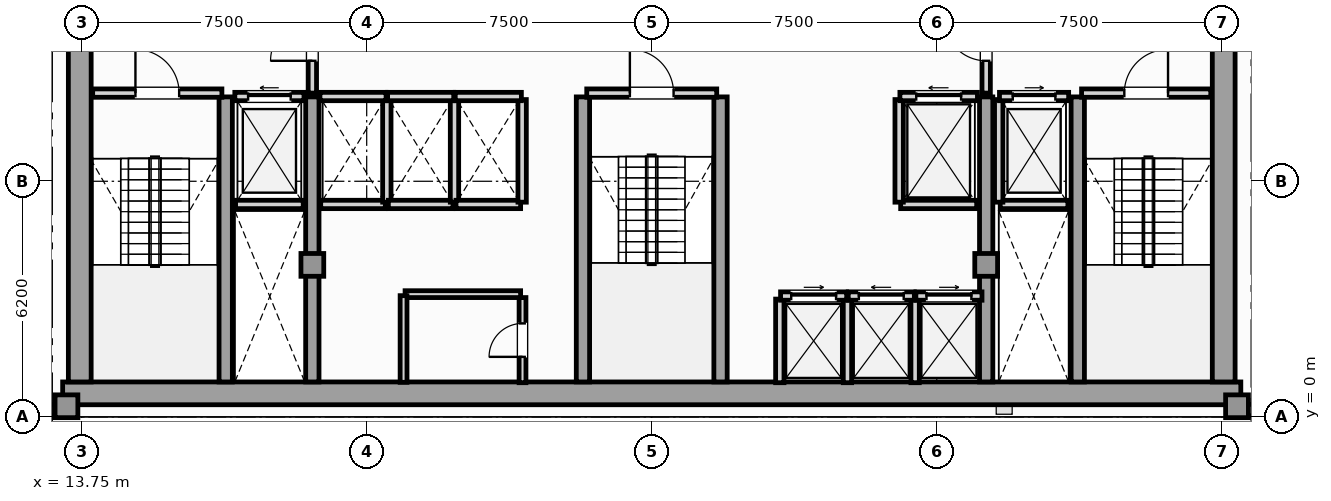
"""IFC4 building model, lengths in metres.
Left out: names, types, materials, properties, quantities, classifications, styles, units other than length and angle.
Written with IfcOpenShell. Run it as: python <this file> out.ifc"""

import sys

from ifc_helpers import new_model, si_unit, direction, frame, frame_2d, origin, origin_2d, place, context, subcontext, project, spatial, rectangle, extrude, element, fill, save


model = new_model("IFC4")
c1 = context("Model", 3, precision=1e-05, world=origin(), true_north=direction((0.0, 1.0)))
c2 = subcontext(c1, "Body", "Model", "MODEL_VIEW")
j1 = project(units=[si_unit("LENGTHUNIT", "METRE"), si_unit("PLANEANGLEUNIT", "RADIAN")], contexts=[c1])
p1 = place(None, origin())
s1 = spatial("IfcSite", under=j1, at=p1, CompositionType="ELEMENT")
p2 = place(p1, origin())
s2 = spatial("IfcBuilding", under=s1, at=p2, CompositionType="ELEMENT")
p3 = place(p2, frame((0.0, 0.0, 234.95)))
s3 = spatial("IfcBuildingStorey", under=s2, at=p3, CompositionType="ELEMENT", Elevation=234.95)
p4 = place(p3, frame((13.25, 0.62, 0.0), z_axis=(0.0, 0.0, 1.0), x_axis=(1.0, 0.0, 0.0)))
e1 = element("IfcWall", 1, at=p4, inside=s3, PredefinedType="SHEAR", context=c2, shape_type="SweptSolid", body=[
    extrude(rectangle(XDim=31.0, YDim=0.6, at=frame_2d((15.5, 0.0))), origin(), (0.0, 0.0, 1.0), 3.63),
])
for number, where, z_axis, x_axis in (
    (2, (13.7, 0.92, 0.0), (0.0, 0.0, 1.0), (0.0, 1.0, 0.0)),
    (3, (43.8, 0.92, 0.0), (0.0, 0.0, 1.0), (0.0, 1.0, 0.0)),
):
    element("IfcWall", number, at=place(p3, frame(where, z_axis=z_axis, x_axis=x_axis)), inside=s3, PredefinedType="SHEAR", context=c2, shape_type="SweptSolid", body=[
        extrude(rectangle(XDim=10.53, YDim=0.6, at=frame_2d((5.265, 0.0))), origin(), (0.0, 0.0, 1.0), 3.63),
    ])
for number, where, z_axis, x_axis in (
    (4, (17.54, 0.92, 0.0), (0.0, 0.0, 1.0), (0.0, 1.0, 0.0)),
    (5, (19.82, 0.92, 0.0), (0.0, 0.0, 1.0), (0.0, 1.0, 0.0)),
    (6, (26.94, 0.92, 0.0), (0.0, 0.0, 1.0), (0.0, 1.0, 0.0)),
    (7, (30.56, 0.92, 0.0), (0.0, 0.0, 1.0), (0.0, 1.0, 0.0)),
    (8, (37.55, 0.92, 0.0), (0.0, 0.0, 1.0), (0.0, 1.0, 0.0)),
    (9, (39.96, 0.92, 0.0), (0.0, 0.0, 1.0), (0.0, 1.0, 0.0)),
):
    element("IfcWall", number, at=place(p3, frame(where, z_axis=z_axis, x_axis=x_axis)), inside=s3, PredefinedType="SHEAR", context=c2, shape_type="SweptSolid", body=[
        extrude(rectangle(XDim=7.5, YDim=0.35, at=frame_2d((3.75, 0.0))), origin(), (0.0, 0.0, 1.0), 3.63),
    ])
for number, where, z_axis, x_axis in (
    (10, (13.35, 0.28, 0.0), (0.0, 0.0, 1.0), (1.0, 0.0, 0.0)),
    (11, (44.15, 0.28, 0.0), (0.0, 0.0, 1.0), (1.0, 0.0, 0.0)),
    (12, (19.82, 4.0, 0.0), (0.0, 0.0, 1.0), (1.0, 0.0, 0.0)),
    (13, (37.55, 4.0, 0.0), (0.0, 0.0, 1.0), (1.0, 0.0, 0.0)),
):
    element("IfcColumn", number, at=place(p3, frame(where, z_axis=z_axis, x_axis=x_axis)), inside=s3, PredefinedType="COLUMN", context=c2, shape_type="SweptSolid", body=[
        extrude(rectangle(XDim=0.6, YDim=0.6, at=origin_2d()), origin(), (0.0, 0.0, 1.0), 3.85),
    ])
for number, where, z_axis, x_axis in (
    (14, (10.811, 0.18, 0.0), (0.0, 0.0, 1.0), (1.0, 0.0, 0.0)),
    (15, (44.25, 0.18, 0.0), (0.0, 0.0, 1.0), (1.0, 0.0, 0.0)),
):
    element("IfcWall", number, at=place(p3, frame(where, z_axis=z_axis, x_axis=x_axis)), inside=s3, PredefinedType="SOLIDWALL", context=c2, shape_type="SweptSolid", body=[
        extrude(rectangle(XDim=2.439, YDim=0.3, at=frame_2d((1.219, 0.0))), origin(), (0.0, 0.0, 1.0), 3.63),
    ])
p5 = place(p3, frame((17.8, 5.59, 0.0), z_axis=(0.0, 0.0, 1.0), x_axis=(1.0, 0.0, 0.0)))
e16 = element("IfcWall", 16, at=p5, inside=s3, PredefinedType="SOLIDWALL", context=c2, shape_type="SweptSolid", body=[
    extrude(rectangle(XDim=1.78, YDim=0.22, at=frame_2d((0.89, 0.0))), origin(), (0.0, 0.0, 1.0), 3.63),
])
p6 = place(p3, frame((17.78, 8.43, 0.0), z_axis=(0.0, 0.0, 1.0), x_axis=(1.0, 0.0, 0.0)))
e17 = element("IfcWall", 17, at=p6, inside=s3, PredefinedType="SOLIDWALL", context=c2, shape_type="SweptSolid", body=[
    extrude(rectangle(XDim=1.82, YDim=0.22, at=frame_2d((0.91, 0.0))), origin(), (0.0, 0.0, 1.0), 3.63),
])
p7 = place(p6, frame((0.35, 0.0, 0.0)))
e18 = element("IfcOpeningElement", 18, at=p7, cuts=e17, PredefinedType="OPENING", context=c2, shape_type="SweptSolid", body=[
    extrude(rectangle(XDim=1.12, YDim=2.25, at=frame_2d((0.56, 1.125))), frame((0.0, 0.12, 0.0), z_axis=(0.0, -1.0, 0.0), x_axis=(1.0, 0.0, 0.0)), (0.0, 0.0, 1.0), 0.24),
])
p8 = place(p3, frame((37.92, 5.59, 0.0), z_axis=(0.0, 0.0, 1.0), x_axis=(1.0, 0.0, 0.0)))
e19 = element("IfcWall", 19, at=p8, inside=s3, PredefinedType="SOLIDWALL", context=c2, shape_type="SweptSolid", body=[
    extrude(rectangle(XDim=1.78, YDim=0.22, at=frame_2d((0.89, 0.0))), origin(), (0.0, 0.0, 1.0), 3.63),
])
p9 = place(p3, frame((37.88, 5.65, 0.0), z_axis=(0.0, 0.0, 1.0), x_axis=(0.0, 1.0, 0.0)))
e20 = element("IfcWall", 20, at=p9, inside=s3, PredefinedType="SOLIDWALL", context=c2, shape_type="SweptSolid", body=[
    extrude(rectangle(XDim=2.7, YDim=0.22, at=frame_2d((1.35, 0.0))), origin(), (0.0, 0.0, 1.0), 3.63),
])
p10 = place(p3, frame((37.9, 8.43, 0.0), z_axis=(0.0, 0.0, 1.0), x_axis=(1.0, 0.0, 0.0)))
e21 = element("IfcWall", 21, at=p10, inside=s3, PredefinedType="SOLIDWALL", context=c2, shape_type="SweptSolid", body=[
    extrude(rectangle(XDim=1.82, YDim=0.22, at=frame_2d((0.91, 0.0))), origin(), (0.0, 0.0, 1.0), 3.63),
])
p11 = place(p10, frame((0.35, 0.0, 0.0)))
e22 = element("IfcOpeningElement", 22, at=p11, cuts=e21, PredefinedType="OPENING", context=c2, shape_type="SweptSolid", body=[
    extrude(rectangle(XDim=1.12, YDim=2.25, at=frame_2d((0.56, 1.125))), frame((0.0, 0.12, 0.0), z_axis=(0.0, -1.0, 0.0), x_axis=(1.0, 0.0, 0.0)), (0.0, 0.0, 1.0), 0.24),
])
p12 = place(p3, frame((35.3, 5.59, 0.0), z_axis=(0.0, 0.0, 1.0), x_axis=(1.0, 0.0, 0.0)))
e23 = element("IfcWall", 23, at=p12, inside=s3, PredefinedType="SOLIDWALL", context=c2, shape_type="SweptSolid", body=[
    extrude(rectangle(XDim=2.0, YDim=0.22, at=frame_2d((1.0, 0.0))), origin(), (0.0, 0.0, 1.0), 3.63),
])
p13 = place(p3, frame((35.26, 5.65, 0.0), z_axis=(0.0, 0.0, 1.0), x_axis=(0.0, 1.0, 0.0)))
e24 = element("IfcWall", 24, at=p13, inside=s3, PredefinedType="SOLIDWALL", context=c2, shape_type="SweptSolid", body=[
    extrude(rectangle(XDim=2.7, YDim=0.22, at=frame_2d((1.35, 0.0))), origin(), (0.0, 0.0, 1.0), 3.63),
])
p14 = place(p3, frame((35.28, 8.43, 0.0), z_axis=(0.0, 0.0, 1.0), x_axis=(1.0, 0.0, 0.0)))
e25 = element("IfcWall", 25, at=p14, inside=s3, PredefinedType="SOLIDWALL", context=c2, shape_type="SweptSolid", body=[
    extrude(rectangle(XDim=2.04, YDim=0.22, at=frame_2d((1.02, 0.0))), origin(), (0.0, 0.0, 1.0), 3.63),
])
p15 = place(p14, frame((0.43, 0.0, 0.0)))
e26 = element("IfcOpeningElement", 26, at=p15, cuts=e25, PredefinedType="OPENING", context=c2, shape_type="SweptSolid", body=[
    extrude(rectangle(XDim=1.18, YDim=2.2, at=frame_2d((0.59, 1.1))), frame((0.0, 0.12, 0.0), z_axis=(0.0, -1.0, 0.0), x_axis=(1.0, 0.0, 0.0)), (0.0, 0.0, 1.0), 0.24),
])
for number, where, z_axis, x_axis in (
    (27, (32.12, 0.9, 0.0), (0.0, 0.0, 1.0), (0.0, 1.0, 0.0)),
    (28, (33.9, 0.9, 0.0), (0.0, 0.0, 1.0), (0.0, 1.0, 0.0)),
):
    element("IfcWall", number, at=place(p3, frame(where, z_axis=z_axis, x_axis=x_axis)), inside=s3, PredefinedType="SOLIDWALL", context=c2, shape_type="SweptSolid", body=[
        extrude(rectangle(XDim=2.2, YDim=0.22, at=frame_2d((1.1, 0.0))), origin(), (0.0, 0.0, 1.0), 3.63),
    ])
p16 = place(p3, frame((32.14, 3.18, 0.0), z_axis=(0.0, 0.0, 1.0), x_axis=(1.0, 0.0, 0.0)))
e29 = element("IfcWall", 29, at=p16, inside=s3, PredefinedType="SOLIDWALL", context=c2, shape_type="SweptSolid", body=[
    extrude(rectangle(XDim=1.74, YDim=0.22, at=frame_2d((0.87, 0.0))), origin(), (0.0, 0.0, 1.0), 3.63),
])
p17 = place(p16, frame((0.28, 0.0, 0.0)))
e30 = element("IfcOpeningElement", 30, at=p17, cuts=e29, PredefinedType="OPENING", context=c2, shape_type="SweptSolid", body=[
    extrude(rectangle(XDim=1.18, YDim=2.2, at=frame_2d((0.59, 1.1))), frame((0.0, 0.12, 0.0), z_axis=(0.0, -1.0, 0.0), x_axis=(1.0, 0.0, 0.0)), (0.0, 0.0, 1.0), 0.24),
])
p18 = place(p3, frame((35.68, 0.9, 0.0), z_axis=(0.0, 0.0, 1.0), x_axis=(0.0, 1.0, 0.0)))
e31 = element("IfcWall", 31, at=p18, inside=s3, PredefinedType="SOLIDWALL", context=c2, shape_type="SweptSolid", body=[
    extrude(rectangle(XDim=2.2, YDim=0.22, at=frame_2d((1.1, 0.0))), origin(), (0.0, 0.0, 1.0), 3.63),
])
p19 = place(p3, frame((33.92, 3.18, 0.0), z_axis=(0.0, 0.0, 1.0), x_axis=(1.0, 0.0, 0.0)))
e32 = element("IfcWall", 32, at=p19, inside=s3, PredefinedType="SOLIDWALL", context=c2, shape_type="SweptSolid", body=[
    extrude(rectangle(XDim=1.74, YDim=0.22, at=frame_2d((0.87, 0.0))), origin(), (0.0, 0.0, 1.0), 3.63),
])
p20 = place(p19, frame((0.28, 0.0, 0.0)))
e33 = element("IfcOpeningElement", 33, at=p20, cuts=e32, PredefinedType="OPENING", context=c2, shape_type="SweptSolid", body=[
    extrude(rectangle(XDim=1.18, YDim=2.2, at=frame_2d((0.59, 1.1))), frame((0.0, 0.12, 0.0), z_axis=(0.0, -1.0, 0.0), x_axis=(1.0, 0.0, 0.0)), (0.0, 0.0, 1.0), 0.24),
])
p21 = place(p3, frame((35.7, 3.18, 0.0), z_axis=(0.0, 0.0, 1.0), x_axis=(1.0, 0.0, 0.0)))
e34 = element("IfcWall", 34, at=p21, inside=s3, PredefinedType="SOLIDWALL", context=c2, shape_type="SweptSolid", body=[
    extrude(rectangle(XDim=1.74, YDim=0.22, at=frame_2d((0.87, 0.0))), origin(), (0.0, 0.0, 1.0), 3.63),
])
p22 = place(p21, frame((0.28, 0.0, 0.0)))
e35 = element("IfcOpeningElement", 35, at=p22, cuts=e34, PredefinedType="OPENING", context=c2, shape_type="SweptSolid", body=[
    extrude(rectangle(XDim=1.18, YDim=2.2, at=frame_2d((0.59, 1.1))), frame((0.0, 0.12, 0.0), z_axis=(0.0, -1.0, 0.0), x_axis=(1.0, 0.0, 0.0)), (0.0, 0.0, 1.0), 0.24),
])
p23 = place(p3, frame((20.04, 5.59, 0.0), z_axis=(0.0, 0.0, 1.0), x_axis=(1.0, 0.0, 0.0)))
e36 = element("IfcWall", 36, at=p23, inside=s3, PredefinedType="SOLIDWALL", context=c2, shape_type="SweptSolid", body=[
    extrude(rectangle(XDim=1.7, YDim=0.22, at=frame_2d((0.85, 0.0))), origin(), (0.0, 0.0, 1.0), 3.63),
])
p24 = place(p3, frame((21.78, 5.65, 0.0), z_axis=(0.0, 0.0, 1.0), x_axis=(0.0, 1.0, 0.0)))
e37 = element("IfcWall", 37, at=p24, inside=s3, PredefinedType="SOLIDWALL", context=c2, shape_type="SweptSolid", body=[
    extrude(rectangle(XDim=2.7, YDim=0.22, at=frame_2d((1.35, 0.0))), origin(), (0.0, 0.0, 1.0), 3.63),
])
p25 = place(p3, frame((20.02, 8.43, 0.0), z_axis=(0.0, 0.0, 1.0), x_axis=(1.0, 0.0, 0.0)))
e38 = element("IfcWall", 38, at=p25, inside=s3, PredefinedType="SOLIDWALL", context=c2, shape_type="SweptSolid", body=[
    extrude(rectangle(XDim=1.74, YDim=0.22, at=frame_2d((0.87, 0.0))), origin(), (0.0, 0.0, 1.0), 3.63),
])
p26 = place(p3, frame((21.82, 5.59, 0.0), z_axis=(0.0, 0.0, 1.0), x_axis=(1.0, 0.0, 0.0)))
e39 = element("IfcWall", 39, at=p26, inside=s3, PredefinedType="SOLIDWALL", context=c2, shape_type="SweptSolid", body=[
    extrude(rectangle(XDim=1.7, YDim=0.22, at=frame_2d((0.85, 0.0))), origin(), (0.0, 0.0, 1.0), 3.63),
])
p27 = place(p3, frame((23.56, 5.65, 0.0), z_axis=(0.0, 0.0, 1.0), x_axis=(0.0, 1.0, 0.0)))
e40 = element("IfcWall", 40, at=p27, inside=s3, PredefinedType="SOLIDWALL", context=c2, shape_type="SweptSolid", body=[
    extrude(rectangle(XDim=2.7, YDim=0.22, at=frame_2d((1.35, 0.0))), origin(), (0.0, 0.0, 1.0), 3.63),
])
p28 = place(p3, frame((21.8, 8.43, 0.0), z_axis=(0.0, 0.0, 1.0), x_axis=(1.0, 0.0, 0.0)))
e41 = element("IfcWall", 41, at=p28, inside=s3, PredefinedType="SOLIDWALL", context=c2, shape_type="SweptSolid", body=[
    extrude(rectangle(XDim=1.74, YDim=0.22, at=frame_2d((0.87, 0.0))), origin(), (0.0, 0.0, 1.0), 3.63),
])
p29 = place(p3, frame((23.6, 5.59, 0.0), z_axis=(0.0, 0.0, 1.0), x_axis=(1.0, 0.0, 0.0)))
e42 = element("IfcWall", 42, at=p29, inside=s3, PredefinedType="SOLIDWALL", context=c2, shape_type="SweptSolid", body=[
    extrude(rectangle(XDim=1.7, YDim=0.22, at=frame_2d((0.85, 0.0))), origin(), (0.0, 0.0, 1.0), 3.63),
])
p30 = place(p3, frame((25.34, 5.65, 0.0), z_axis=(0.0, 0.0, 1.0), x_axis=(0.0, 1.0, 0.0)))
e43 = element("IfcWall", 43, at=p30, inside=s3, PredefinedType="SOLIDWALL", context=c2, shape_type="SweptSolid", body=[
    extrude(rectangle(XDim=2.7, YDim=0.22, at=frame_2d((1.35, 0.0))), origin(), (0.0, 0.0, 1.0), 3.63),
])
p31 = place(p3, frame((23.58, 8.43, 0.0), z_axis=(0.0, 0.0, 1.0), x_axis=(1.0, 0.0, 0.0)))
e44 = element("IfcWall", 44, at=p31, inside=s3, PredefinedType="SOLIDWALL", context=c2, shape_type="SweptSolid", body=[
    extrude(rectangle(XDim=1.74, YDim=0.22, at=frame_2d((0.87, 0.0))), origin(), (0.0, 0.0, 1.0), 3.63),
])
p32 = place(p3, frame((14.04, 8.52, 0.0), z_axis=(0.0, 0.0, 1.0), x_axis=(1.0, 0.0, 0.0)))
e45 = element("IfcWall", 45, at=p32, inside=s3, PredefinedType="SOLIDWALL", context=c2, shape_type="SweptSolid", body=[
    extrude(rectangle(XDim=3.4, YDim=0.22, at=frame_2d((1.7, 0.0))), origin(), (0.0, 0.0, 1.0), 3.63),
])
p33 = place(p32, frame((1.125, 0.0, 0.0)))
e46 = element("IfcOpeningElement", 46, at=p33, cuts=e45, PredefinedType="OPENING", context=c2, shape_type="SweptSolid", body=[
    extrude(rectangle(XDim=1.15, YDim=2.2, at=frame_2d((0.575, 1.1))), frame((0.0, 0.12, 0.0), z_axis=(0.0, -1.0, 0.0), x_axis=(1.0, 0.0, 0.0)), (0.0, 0.0, 1.0), 0.24),
])
p34 = place(p3, frame((40.06, 8.52, 0.0), z_axis=(0.0, 0.0, 1.0), x_axis=(1.0, 0.0, 0.0)))
e47 = element("IfcWall", 47, at=p34, inside=s3, PredefinedType="SOLIDWALL", context=c2, shape_type="SweptSolid", body=[
    extrude(rectangle(XDim=3.4, YDim=0.22, at=frame_2d((1.7, 0.0))), origin(), (0.0, 0.0, 1.0), 3.63),
])
p35 = place(p34, frame((1.125, 0.0, 0.0)))
e48 = element("IfcOpeningElement", 48, at=p35, cuts=e47, PredefinedType="OPENING", context=c2, shape_type="SweptSolid", body=[
    extrude(rectangle(XDim=1.15, YDim=2.2, at=frame_2d((0.575, 1.1))), frame((0.0, 0.12, 0.0), z_axis=(0.0, -1.0, 0.0), x_axis=(1.0, 0.0, 0.0)), (0.0, 0.0, 1.0), 0.24),
])
p36 = place(p3, frame((27.04, 8.52, 0.0), z_axis=(0.0, 0.0, 1.0), x_axis=(1.0, 0.0, 0.0)))
e49 = element("IfcWall", 49, at=p36, inside=s3, PredefinedType="SOLIDWALL", context=c2, shape_type="SweptSolid", body=[
    extrude(rectangle(XDim=3.42, YDim=0.22, at=frame_2d((1.71, 0.0))), origin(), (0.0, 0.0, 1.0), 3.63),
])
p37 = place(p36, frame((1.135, 0.0, 0.0)))
e50 = element("IfcOpeningElement", 50, at=p37, cuts=e49, PredefinedType="OPENING", context=c2, shape_type="SweptSolid", body=[
    extrude(rectangle(XDim=1.15, YDim=2.2, at=frame_2d((0.575, 1.1))), frame((0.0, 0.12, 0.0), z_axis=(0.0, -1.0, 0.0), x_axis=(1.0, 0.0, 0.0)), (0.0, 0.0, 1.0), 0.24),
])
p38 = place(p3, frame((19.82, 8.52, 0.0), z_axis=(0.0, 0.0, 1.0), x_axis=(0.0, 1.0, 0.0)))
e51 = element("IfcWall", 51, at=p38, inside=s3, PredefinedType="SOLIDWALL", context=c2, shape_type="SweptSolid", body=[
    extrude(rectangle(XDim=2.8, YDim=0.22, at=frame_2d((1.4, 0.0))), origin(), (0.0, 0.0, 1.0), 3.085),
])
p39 = place(p38, frame((0.85, 0.0, 0.0)))
e52 = element("IfcOpeningElement", 52, at=p39, cuts=e51, PredefinedType="OPENING", context=c2, shape_type="SweptSolid", body=[
    extrude(rectangle(XDim=1.1, YDim=2.2, at=frame_2d((0.55, 1.1))), frame((0.0, 0.12, 0.0), z_axis=(0.0, -1.0, 0.0), x_axis=(1.0, 0.0, 0.0)), (0.0, 0.0, 1.0), 0.24),
])
p40 = place(p3, frame((37.55, 8.52, 0.0), z_axis=(0.0, 0.0, 1.0), x_axis=(0.0, 1.0, 0.0)))
e53 = element("IfcWall", 53, at=p40, inside=s3, PredefinedType="SOLIDWALL", context=c2, shape_type="SweptSolid", body=[
    extrude(rectangle(XDim=2.8, YDim=0.22, at=frame_2d((1.4, 0.0))), origin(), (0.0, 0.0, 1.0), 3.085),
])
p41 = place(p40, frame((0.85, 0.0, 0.0)))
e54 = element("IfcOpeningElement", 54, at=p41, cuts=e53, PredefinedType="OPENING", context=c2, shape_type="SweptSolid", body=[
    extrude(rectangle(XDim=1.1, YDim=2.2, at=frame_2d((0.55, 1.1))), frame((0.0, 0.12, 0.0), z_axis=(0.0, -1.0, 0.0), x_axis=(1.0, 0.0, 0.0)), (0.0, 0.0, 1.0), 0.24),
])
p42 = place(p3, frame((25.35, 0.9, 0.0), z_axis=(0.0, 0.0, 1.0), x_axis=(0.0, 1.0, 0.0)))
e55 = element("IfcWall", 55, at=p42, inside=s3, PredefinedType="PARTITIONING", context=c2, shape_type="SweptSolid", body=[
    extrude(rectangle(XDim=2.24, YDim=0.18, at=frame_2d((1.12, 0.0))), origin(), (0.0, 0.0, 1.0), 3.63),
])
p43 = place(p42, frame((0.68, 0.0, 0.0)))
e56 = element("IfcOpeningElement", 56, at=p43, cuts=e55, PredefinedType="OPENING", context=c2, shape_type="SweptSolid", body=[
    extrude(rectangle(XDim=0.88, YDim=2.05, at=frame_2d((0.44, 1.025))), frame((0.0, 0.1, 0.0), z_axis=(0.0, -1.0, 0.0), x_axis=(1.0, 0.0, 0.0)), (0.0, 0.0, 1.0), 0.2),
])
p44 = place(p3, frame((22.26, 3.23, 0.0), z_axis=(0.0, 0.0, 1.0), x_axis=(1.0, 0.0, 0.0)))
e57 = element("IfcWall", 57, at=p44, inside=s3, PredefinedType="PARTITIONING", context=c2, shape_type="SweptSolid", body=[
    extrude(rectangle(XDim=3.04, YDim=0.18, at=frame_2d((1.52, 0.0))), origin(), (0.0, 0.0, 1.0), 3.63),
])
p45 = place(p3, frame((22.22, 0.91, 0.0), z_axis=(0.0, 0.0, 1.0), x_axis=(0.0, 1.0, 0.0)))
e58 = element("IfcWall", 58, at=p45, inside=s3, PredefinedType="PARTITIONING", context=c2, shape_type="SweptSolid", body=[
    extrude(rectangle(XDim=2.28, YDim=0.18, at=frame_2d((1.14, 0.0))), origin(), (0.0, 0.0, 1.0), 3.63),
])
p46 = place(p7, origin())
e59 = element("IfcDoor", 59, at=p46, inside=s3, OperationType="SLIDING_TO_LEFT", PredefinedType="DOOR", context=c2, shape_type="SweptSolid", body=[
    extrude(rectangle(XDim=1.12, YDim=2.25, at=frame_2d((0.56, 1.125))), frame((0.0, 0.025, 0.0), z_axis=(0.0, -1.0, 0.0), x_axis=(1.0, 0.0, 0.0)), (0.0, 0.0, 1.0), 0.05),
])
fill(e18, e59)
p47 = place(p11, origin())
e60 = element("IfcDoor", 60, at=p47, inside=s3, OperationType="SLIDING_TO_RIGHT", PredefinedType="DOOR", context=c2, shape_type="SweptSolid", body=[
    extrude(rectangle(XDim=1.12, YDim=2.25, at=frame_2d((0.56, 1.125))), frame((0.0, 0.025, 0.0), z_axis=(0.0, -1.0, 0.0), x_axis=(1.0, 0.0, 0.0)), (0.0, 0.0, 1.0), 0.05),
])
fill(e22, e60)
p48 = place(p15, origin())
e61 = element("IfcDoor", 61, at=p48, inside=s3, OperationType="SLIDING_TO_LEFT", PredefinedType="DOOR", context=c2, shape_type="SweptSolid", body=[
    extrude(rectangle(XDim=1.18, YDim=2.2, at=frame_2d((0.59, 1.1))), frame((0.0, 0.025, 0.0), z_axis=(0.0, -1.0, 0.0), x_axis=(1.0, 0.0, 0.0)), (0.0, 0.0, 1.0), 0.05),
])
fill(e26, e61)
p49 = place(p17, origin())
e62 = element("IfcDoor", 62, at=p49, inside=s3, OperationType="SLIDING_TO_RIGHT", PredefinedType="DOOR", context=c2, shape_type="SweptSolid", body=[
    extrude(rectangle(XDim=1.18, YDim=2.2, at=frame_2d((0.59, 1.1))), frame((0.0, 0.025, 0.0), z_axis=(0.0, -1.0, 0.0), x_axis=(1.0, 0.0, 0.0)), (0.0, 0.0, 1.0), 0.05),
])
fill(e30, e62)
p50 = place(p20, origin())
e63 = element("IfcDoor", 63, at=p50, inside=s3, OperationType="SLIDING_TO_LEFT", PredefinedType="DOOR", context=c2, shape_type="SweptSolid", body=[
    extrude(rectangle(XDim=1.18, YDim=2.2, at=frame_2d((0.59, 1.1))), frame((0.0, 0.025, 0.0), z_axis=(0.0, -1.0, 0.0), x_axis=(1.0, 0.0, 0.0)), (0.0, 0.0, 1.0), 0.05),
])
fill(e33, e63)
p51 = place(p22, origin())
e64 = element("IfcDoor", 64, at=p51, inside=s3, OperationType="SLIDING_TO_RIGHT", PredefinedType="DOOR", context=c2, shape_type="SweptSolid", body=[
    extrude(rectangle(XDim=1.18, YDim=2.2, at=frame_2d((0.59, 1.1))), frame((0.0, 0.025, 0.0), z_axis=(0.0, -1.0, 0.0), x_axis=(1.0, 0.0, 0.0)), (0.0, 0.0, 1.0), 0.05),
])
fill(e35, e64)
p52 = place(p33, origin())
e65 = element("IfcDoor", 65, at=p52, inside=s3, OperationType="SINGLE_SWING_LEFT", PredefinedType="DOOR", context=c2, shape_type="SweptSolid", body=[
    extrude(rectangle(XDim=1.15, YDim=2.2, at=frame_2d((0.575, 1.1))), frame((0.0, 0.025, 0.0), z_axis=(0.0, -1.0, 0.0), x_axis=(1.0, 0.0, 0.0)), (0.0, 0.0, 1.0), 0.05),
])
fill(e46, e65)
p53 = place(p35, origin())
e66 = element("IfcDoor", 66, at=p53, inside=s3, OperationType="SINGLE_SWING_RIGHT", PredefinedType="DOOR", context=c2, shape_type="SweptSolid", body=[
    extrude(rectangle(XDim=1.15, YDim=2.2, at=frame_2d((0.575, 1.1))), frame((0.0, 0.025, 0.0), z_axis=(0.0, -1.0, 0.0), x_axis=(1.0, 0.0, 0.0)), (0.0, 0.0, 1.0), 0.05),
])
fill(e48, e66)
p54 = place(p37, origin())
e67 = element("IfcDoor", 67, at=p54, inside=s3, OperationType="SINGLE_SWING_LEFT", PredefinedType="DOOR", context=c2, shape_type="SweptSolid", body=[
    extrude(rectangle(XDim=1.15, YDim=2.2, at=frame_2d((0.575, 1.1))), frame((0.0, 0.025, 0.0), z_axis=(0.0, -1.0, 0.0), x_axis=(1.0, 0.0, 0.0)), (0.0, 0.0, 1.0), 0.05),
])
fill(e50, e67)
p55 = place(p39, origin())
e68 = element("IfcDoor", 68, at=p55, inside=s3, OperationType="SINGLE_SWING_LEFT", PredefinedType="DOOR", context=c2, shape_type="SweptSolid", body=[
    extrude(rectangle(XDim=1.1, YDim=2.2, at=frame_2d((0.55, 1.1))), frame((0.0, 0.025, 0.0), z_axis=(0.0, -1.0, 0.0), x_axis=(1.0, 0.0, 0.0)), (0.0, 0.0, 1.0), 0.05),
])
fill(e52, e68)
p56 = place(p41, origin())
e69 = element("IfcDoor", 69, at=p56, inside=s3, OperationType="SINGLE_SWING_RIGHT", PredefinedType="DOOR", context=c2, shape_type="SweptSolid", body=[
    extrude(rectangle(XDim=1.1, YDim=2.2, at=frame_2d((0.55, 1.1))), frame((0.0, 0.025, 0.0), z_axis=(0.0, -1.0, 0.0), x_axis=(1.0, 0.0, 0.0)), (0.0, 0.0, 1.0), 0.05),
])
fill(e54, e69)
p57 = place(p43, origin())
e70 = element("IfcDoor", 70, at=p57, inside=s3, OperationType="SINGLE_SWING_LEFT", PredefinedType="DOOR", context=c2, shape_type="SweptSolid", body=[
    extrude(rectangle(XDim=0.88, YDim=2.05, at=frame_2d((0.44, 1.025))), frame((0.0, 0.025, 0.0), z_axis=(0.0, -1.0, 0.0), x_axis=(1.0, 0.0, 0.0)), (0.0, 0.0, 1.0), 0.05),
])
fill(e56, e70)
save(model, sys.argv[1])
